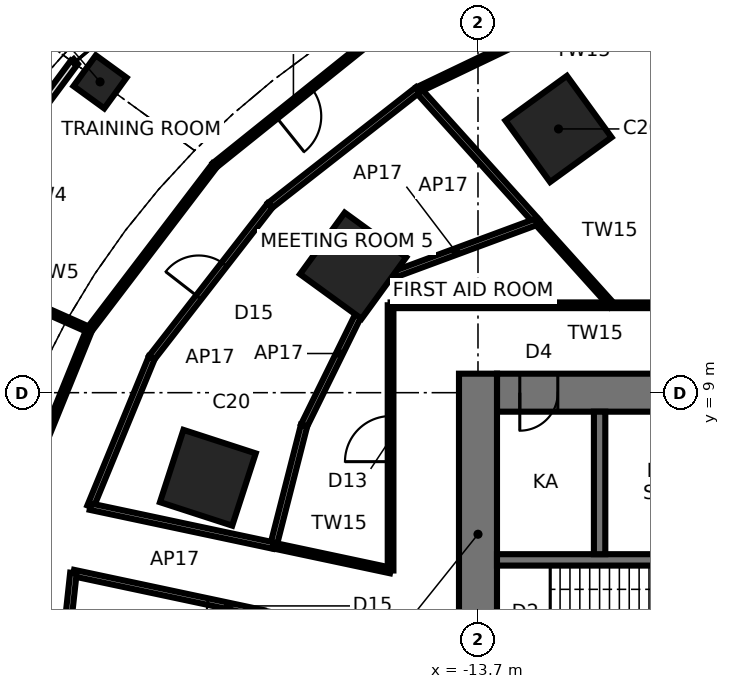
"""IFC4 building model, lengths in metres.
Left out: names, types, materials, properties, quantities, classifications, styles, units other than length and angle.
Written with IfcOpenShell. Run it as: python <this file> out.ifc"""

import sys

from ifc_helpers import new_model, si_unit, direction, frame, frame_2d, origin, origin_2d, place, context, subcontext, project, spatial, rectangle, extrude, element, fill, save


model = new_model("IFC4")
c1 = context("Model", 3, precision=1e-05, world=origin(), true_north=direction((0.0, 1.0)))
c2 = subcontext(c1, "Body", "Model", "MODEL_VIEW")
j1 = project(units=[si_unit("LENGTHUNIT", "METRE"), si_unit("PLANEANGLEUNIT", "RADIAN")], contexts=[c1])
p1 = place(None, origin())
s1 = spatial("IfcSite", under=j1, at=p1, CompositionType="ELEMENT")
p2 = place(p1, origin())
s2 = spatial("IfcBuilding", under=s1, at=p2, CompositionType="ELEMENT")
p3 = place(p2, frame((0.0, 0.0, 15.1)))
s3 = spatial("IfcBuildingStorey", under=s2, at=p3, CompositionType="ELEMENT", Elevation=15.1)
for number, where, z_axis, x_axis in (
    (1, (-11.581, 15.94, 0.0), (0.0, 0.0, 1.0), (-0.588, 0.809, 0.0)),
    (2, (-16.986, 12.341, 0.0), (0.0, 0.0, 1.0), (-0.809, 0.588, 0.0)),
    (3, (-20.808, 6.761, 0.0), (0.0, 0.0, 1.0), (-0.951, 0.309, 0.0)),
):
    element("IfcColumn", number, at=place(p3, frame(where, z_axis=z_axis, x_axis=x_axis)), inside=s3, PredefinedType="COLUMN", context=c2, shape_type="SweptSolid", body=[
        extrude(rectangle(XDim=2.0, YDim=2.0, at=origin_2d()), origin(), (0.0, 0.0, 1.0), 4.5),
    ])
p4 = place(p3, frame((-23.645, 17.179, 0.0), z_axis=(0.0, 0.0, 1.0), x_axis=(-0.809016994375, 0.587785252292, 0.0)))
e4 = element("IfcColumn", 4, at=p4, inside=s3, PredefinedType="COLUMN", context=c2, shape_type="SweptSolid", body=[
    extrude(rectangle(XDim=1.0, YDim=1.0, at=origin_2d()), origin(), (0.0, 0.0, 1.0), 4.5),
])
p5 = place(p3, frame((13.2, 9.0, 0.0), z_axis=(0.0, 0.0, 1.0), x_axis=(-1.0, 0.0, 0.0)))
e5 = element("IfcWall", 5, at=p5, inside=s3, PredefinedType="SHEAR", context=c2, shape_type="SweptSolid", body=[
    extrude(rectangle(XDim=26.4, YDim=1.0, at=frame_2d((13.2, 0.0))), origin(), (0.0, 0.0, 1.0), 4.5),
])
p6 = place(p5, frame((2.65, 0.0, 0.0)))
e6 = element("IfcOpeningElement", 6, at=p6, cuts=e5, PredefinedType="OPENING", context=c2, shape_type="SweptSolid", body=[
    extrude(rectangle(XDim=0.9, YDim=2.1, at=frame_2d((0.45, 1.05))), frame((0.0, 0.51, 0.0), z_axis=(0.0, -1.0, 0.0), x_axis=(1.0, 0.0, 0.0)), (0.0, 0.0, 1.0), 1.02),
])
p7 = place(p5, frame((9.5, 0.0, 0.0)))
e7 = element("IfcOpeningElement", 7, at=p7, cuts=e5, PredefinedType="OPENING", context=c2, shape_type="SweptSolid", body=[
    extrude(rectangle(XDim=0.9, YDim=2.1, at=frame_2d((0.45, 1.05))), frame((0.0, 0.51, 0.0), z_axis=(0.0, -1.0, 0.0), x_axis=(1.0, 0.0, 0.0)), (0.0, 0.0, 1.0), 1.02),
])
p8 = place(p5, frame((16.0, 0.0, 0.0)))
e8 = element("IfcOpeningElement", 8, at=p8, cuts=e5, PredefinedType="OPENING", context=c2, shape_type="SweptSolid", body=[
    extrude(rectangle(XDim=0.9, YDim=2.1, at=frame_2d((0.45, 1.05))), frame((0.0, 0.51, 0.0), z_axis=(0.0, -1.0, 0.0), x_axis=(1.0, 0.0, 0.0)), (0.0, 0.0, 1.0), 1.02),
])
p9 = place(p5, frame((21.25, 0.0, 0.0)))
e9 = element("IfcOpeningElement", 9, at=p9, cuts=e5, PredefinedType="OPENING", context=c2, shape_type="SweptSolid", body=[
    extrude(rectangle(XDim=0.9, YDim=2.1, at=frame_2d((0.45, 1.05))), frame((0.0, 0.51, 0.0), z_axis=(0.0, -1.0, 0.0), x_axis=(1.0, 0.0, 0.0)), (0.0, 0.0, 1.0), 1.02),
])
p10 = place(p5, frame((24.8, 0.0, 0.0)))
e10 = element("IfcOpeningElement", 10, at=p10, cuts=e5, PredefinedType="OPENING", context=c2, shape_type="SweptSolid", body=[
    extrude(rectangle(XDim=1.0, YDim=2.1, at=frame_2d((0.5, 1.05))), frame((0.0, 0.51, 0.0), z_axis=(0.0, -1.0, 0.0), x_axis=(1.0, 0.0, 0.0)), (0.0, 0.0, 1.0), 1.02),
])
p11 = place(p3, frame((-13.7, 9.5, 0.0), z_axis=(0.0, 0.0, 1.0), x_axis=(0.0, -1.0, 0.0)))
e11 = element("IfcWall", 11, at=p11, inside=s3, PredefinedType="SHEAR", context=c2, shape_type="SweptSolid", body=[
    extrude(rectangle(XDim=19.0, YDim=1.0, at=frame_2d((9.5, 0.0))), origin(), (0.0, 0.0, 1.0), 4.5),
])
p12 = place(p11, frame((8.6, 0.0, 0.0)))
e12 = element("IfcOpeningElement", 12, at=p12, cuts=e11, PredefinedType="OPENING", context=c2, shape_type="SweptSolid", body=[
    extrude(rectangle(XDim=1.8, YDim=2.4, at=frame_2d((0.9, 1.2))), frame((0.0, 0.51, 0.0), z_axis=(0.0, -1.0, 0.0), x_axis=(1.0, 0.0, 0.0)), (0.0, 0.0, 1.0), 1.02),
])
p13 = place(p3, frame((-13.2, 4.6, 0.0), z_axis=(0.0, 0.0, 1.0), x_axis=(1.0, 0.0, 0.0)))
e13 = element("IfcWall", 13, at=p13, inside=s3, PredefinedType="SHEAR", context=c2, shape_type="SweptSolid", body=[
    extrude(rectangle(XDim=26.4, YDim=0.3, at=frame_2d((13.2, 0.0))), origin(), (0.0, 0.0, 1.0), 4.5),
])
p14 = place(p3, frame((-10.5, 4.75, 0.0), z_axis=(0.0, 0.0, 1.0), x_axis=(0.0, 1.0, 0.0)))
e14 = element("IfcWall", 14, at=p14, inside=s3, PredefinedType="SHEAR", context=c2, shape_type="SweptSolid", body=[
    extrude(rectangle(XDim=3.75, YDim=0.3, at=frame_2d((1.875, 0.0))), origin(), (0.0, 0.0, 1.0), 4.5),
])
p15 = place(p3, frame((-24.332, 17.678, 0.0), z_axis=(0.0, 0.0, 1.0), x_axis=(-0.595729578383, -0.803185077949, 0.0)))
e15 = element("IfcWall", 15, at=p15, inside=s3, PredefinedType="SOLIDWALL", context=c2, shape_type="SweptSolid", body=[
    extrude(rectangle(XDim=6.407, YDim=0.2, at=frame_2d((3.203, 0.0))), origin(), (0.0, 0.0, 1.0), 4.3),
])
p16 = place(p15, frame((5.007, 0.0, 0.0)))
e16 = element("IfcOpeningElement", 16, at=p16, cuts=e15, PredefinedType="OPENING", context=c2, shape_type="SweptSolid", body=[
    extrude(rectangle(XDim=1.0, YDim=2.4, at=frame_2d((0.5, 1.2))), frame((0.0, 0.11, 0.0), z_axis=(0.0, -1.0, 0.0), x_axis=(1.0, 0.0, 0.0)), (0.0, 0.0, 1.0), 0.22),
])
p17 = place(p15, frame((3.907, 0.0, 0.3)))
e17 = element("IfcOpeningElement", 17, at=p17, cuts=e15, PredefinedType="OPENING", context=c2, shape_type="SweptSolid", body=[
    extrude(rectangle(XDim=0.9, YDim=2.1, at=frame_2d((0.45, 1.05))), frame((0.0, 0.11, 0.0), z_axis=(0.0, -1.0, 0.0), x_axis=(1.0, 0.0, 0.0)), (0.0, 0.0, 1.0), 0.22),
])
p18 = place(p15, frame((5.007, 0.0, 2.7)))
e18 = element("IfcOpeningElement", 18, at=p18, cuts=e15, PredefinedType="OPENING", context=c2, shape_type="SweptSolid", body=[
    extrude(rectangle(XDim=1.0, YDim=0.6, at=frame_2d((0.5, 0.3))), frame((0.0, 0.11, 0.0), z_axis=(0.0, -1.0, 0.0), x_axis=(1.0, 0.0, 0.0)), (0.0, 0.0, 1.0), 0.22),
])
p19 = place(p3, frame((6.524, 11.3, 0.0), z_axis=(0.0, 0.0, 1.0), x_axis=(-1.0, 0.0, 0.0)))
e19 = element("IfcWall", 19, at=p19, inside=s3, PredefinedType="PARTITIONING", context=c2, shape_type="SweptSolid", body=[
    extrude(rectangle(XDim=22.524, YDim=0.15, at=frame_2d((11.262, 0.0))), origin(), (0.0, 0.0, 1.0), 4.3),
])
p20 = place(p19, frame((10.393, 0.0, 0.0)))
e20 = element("IfcOpeningElement", 20, at=p20, cuts=e19, PredefinedType="OPENING", context=c2, shape_type="SweptSolid", body=[
    extrude(rectangle(XDim=1.2, YDim=2.4, at=frame_2d((0.6, 1.2))), frame((0.0, 0.085, 0.0), z_axis=(0.0, -1.0, 0.0), x_axis=(1.0, 0.0, 0.0)), (0.0, 0.0, 1.0), 0.17),
])
p21 = place(p19, frame((2.068, 0.0, 0.0)))
e21 = element("IfcOpeningElement", 21, at=p21, cuts=e19, PredefinedType="OPENING", context=c2, shape_type="SweptSolid", body=[
    extrude(rectangle(XDim=1.2, YDim=2.4, at=frame_2d((0.6, 1.2))), frame((0.0, 0.085, 0.0), z_axis=(0.0, -1.0, 0.0), x_axis=(1.0, 0.0, 0.0)), (0.0, 0.0, 1.0), 0.17),
])
p22 = place(p3, frame((-15.281, 16.972, 0.0), z_axis=(0.0, 0.0, 1.0), x_axis=(0.901954568833, 0.431830934234, 0.0)))
e22 = element("IfcWall", 22, at=p22, inside=s3, PredefinedType="PARTITIONING", context=c2, shape_type="SweptSolid", body=[
    extrude(rectangle(XDim=4.763, YDim=0.15, at=frame_2d((2.381, 0.0))), origin(), (0.0, 0.0, 1.0), 4.3),
])
p23 = place(p3, frame((-12.156, 13.5, 0.0), z_axis=(0.0, 0.0, 1.0), x_axis=(-0.669135077133, 0.74314079995, 0.0)))
e23 = element("IfcWall", 23, at=p23, inside=s3, PredefinedType="PARTITIONING", context=c2, shape_type="SweptSolid", body=[
    extrude(rectangle(XDim=4.671, YDim=0.17, at=frame_2d((2.336, 0.0))), origin(), (0.0, 0.0, 1.0), 4.3),
])
p24 = place(p3, frame((-10.175, 11.3, 0.0), z_axis=(0.0, 0.0, 1.0), x_axis=(-0.669156051145, 0.7431219141, 0.0)))
e24 = element("IfcWall", 24, at=p24, inside=s3, PredefinedType="PARTITIONING", context=c2, shape_type="SweptSolid", body=[
    extrude(rectangle(XDim=2.961, YDim=0.15, at=frame_2d((1.48, 0.0))), origin(), (0.0, 0.0, 1.0), 4.3),
])
p25 = place(p3, frame((-16.486, 18.309, 0.0), z_axis=(0.0, 0.0, 1.0), x_axis=(-0.779898885774, -0.625905526393, 0.0)))
e25 = element("IfcWall", 25, at=p25, inside=s3, PredefinedType="PARTITIONING", context=c2, shape_type="SweptSolid", body=[
    extrude(rectangle(XDim=5.31, YDim=0.15, at=frame_2d((2.655, 0.0))), origin(), (0.0, 0.0, 1.0), 4.3),
])
p26 = place(p25, frame((2.055, 0.0, 0.0)))
e26 = element("IfcOpeningElement", 26, at=p26, cuts=e25, PredefinedType="OPENING", context=c2, shape_type="SweptSolid", body=[
    extrude(rectangle(XDim=1.2, YDim=2.4, at=frame_2d((0.6, 1.2))), frame((0.0, 0.085, 0.0), z_axis=(0.0, -1.0, 0.0), x_axis=(1.0, 0.0, 0.0)), (0.0, 0.0, 1.0), 0.17),
])
p27 = place(p3, frame((-19.17, 13.928, 0.0), z_axis=(0.0, 0.0, 1.0), x_axis=(0.787485179354, 0.616333588487, 0.0)))
e27 = element("IfcWall", 27, at=p27, inside=s3, PredefinedType="PARTITIONING", context=c2, shape_type="SweptSolid", body=[
    extrude(rectangle(XDim=4.938, YDim=0.17, at=frame_2d((2.469, 0.0))), origin(), (0.0, 0.0, 1.0), 4.3),
])
p28 = place(p3, frame((-16.413, 11.925, 0.0), z_axis=(0.0, 0.0, 1.0), x_axis=(0.937814922048, 0.34713566798, 0.0)))
e28 = element("IfcWall", 28, at=p28, inside=s3, PredefinedType="PARTITIONING", context=c2, shape_type="SweptSolid", body=[
    extrude(rectangle(XDim=4.539, YDim=0.17, at=frame_2d((2.27, 0.0))), origin(), (0.0, 0.0, 1.0), 4.3),
])
p29 = place(p3, frame((-18.276, 8.137, 0.0), z_axis=(0.0, 0.0, 1.0), x_axis=(0.44142043443, 0.897300395669, 0.0)))
e29 = element("IfcWall", 29, at=p29, inside=s3, PredefinedType="PARTITIONING", context=c2, shape_type="SweptSolid", body=[
    extrude(rectangle(XDim=4.221, YDim=0.17, at=frame_2d((2.111, 0.0))), origin(), (0.0, 0.0, 1.0), 4.3),
])
p30 = place(p3, frame((-20.627, 14.986, 0.0), z_axis=(0.0, 0.0, 1.0), x_axis=(-0.606135035954, -0.795361753034, 0.0)))
e30 = element("IfcWall", 30, at=p30, inside=s3, PredefinedType="PARTITIONING", context=c2, shape_type="SweptSolid", body=[
    extrude(rectangle(XDim=5.447, YDim=0.15, at=frame_2d((2.724, 0.0))), origin(), (0.0, 0.0, 1.0), 4.3),
])
p31 = place(p3, frame((-22.284, 9.921, 0.0), z_axis=(0.0, 0.0, 1.0), x_axis=(0.613607456707, 0.789611226537, 0.0)))
e31 = element("IfcWall", 31, at=p31, inside=s3, PredefinedType="PARTITIONING", context=c2, shape_type="SweptSolid", body=[
    extrude(rectangle(XDim=5.074, YDim=0.17, at=frame_2d((2.537, 0.0))), origin(), (0.0, 0.0, 1.0), 4.3),
])
p32 = place(p31, frame((2.012, 0.0, 0.0)))
e32 = element("IfcOpeningElement", 32, at=p32, cuts=e31, PredefinedType="OPENING", context=c2, shape_type="SweptSolid", body=[
    extrude(rectangle(XDim=1.1, YDim=2.4, at=frame_2d((0.55, 1.2))), frame((0.0, 0.095, 0.0), z_axis=(0.0, -1.0, 0.0), x_axis=(1.0, 0.0, 0.0)), (0.0, 0.0, 1.0), 0.19),
])
p33 = place(p3, frame((-16.0, 11.3, 0.0), z_axis=(0.0, 0.0, 1.0), x_axis=(0.0, -1.0, 0.0)))
e33 = element("IfcWall", 33, at=p33, inside=s3, PredefinedType="PARTITIONING", context=c2, shape_type="SweptSolid", body=[
    extrude(rectangle(XDim=6.979, YDim=0.15, at=frame_2d((3.49, 0.0))), origin(), (0.0, 0.0, 1.0), 4.3),
])
p34 = place(p33, frame((2.915, 0.0, 0.0)))
e34 = element("IfcOpeningElement", 34, at=p34, cuts=e33, PredefinedType="OPENING", context=c2, shape_type="SweptSolid", body=[
    extrude(rectangle(XDim=1.2, YDim=2.4, at=frame_2d((0.6, 1.2))), frame((0.0, 0.085, 0.0), z_axis=(0.0, -1.0, 0.0), x_axis=(1.0, 0.0, 0.0)), (0.0, 0.0, 1.0), 0.17),
])
p35 = place(p3, frame((-23.928, 10.654, 0.0), z_axis=(0.0, 0.0, 1.0), x_axis=(-0.913547449471, 0.406732169326, 0.0)))
e35 = element("IfcWall", 35, at=p35, inside=s3, PredefinedType="PARTITIONING", context=c2, shape_type="SweptSolid", body=[
    extrude(rectangle(XDim=4.54, YDim=0.15, at=frame_2d((2.27, 0.0))), origin(), (0.0, 0.0, 1.0), 4.3),
])
p36 = place(p3, frame((-19.083, 4.976, 0.0), z_axis=(0.0, 0.0, 1.0), x_axis=(0.247568605717, 0.968870365665, 0.0)))
e36 = element("IfcWall", 36, at=p36, inside=s3, PredefinedType="PARTITIONING", context=c2, shape_type="SweptSolid", body=[
    extrude(rectangle(XDim=3.262, YDim=0.17, at=frame_2d((1.631, 0.0))), origin(), (0.0, 0.0, 1.0), 4.3),
])
p37 = place(p3, frame((-23.9, 6.0, 0.0), z_axis=(0.0, 0.0, 1.0), x_axis=(0.381027738685, 0.92456360644, 0.0)))
e37 = element("IfcWall", 37, at=p37, inside=s3, PredefinedType="PARTITIONING", context=c2, shape_type="SweptSolid", body=[
    extrude(rectangle(XDim=4.241, YDim=0.17, at=frame_2d((2.121, 0.0))), origin(), (0.0, 0.0, 1.0), 4.3),
])
p38 = place(p3, frame((-23.928, 10.654, 0.0), z_axis=(0.0, 0.0, 1.0), x_axis=(-0.376134336796, -0.92656514109, 0.0)))
e38 = element("IfcWall", 38, at=p38, inside=s3, PredefinedType="PARTITIONING", context=c2, shape_type="SweptSolid", body=[
    extrude(rectangle(XDim=5.531, YDim=0.15, at=frame_2d((2.766, 0.0))), origin(), (0.0, 0.0, 1.0), 4.3),
])
p39 = place(p3, frame((-16.0, 4.321, 0.0), z_axis=(0.0, 0.0, 1.0), x_axis=(-0.978156882567, 0.207868018433, 0.0)))
e39 = element("IfcWall", 39, at=p39, inside=s3, PredefinedType="PARTITIONING", context=c2, shape_type="SweptSolid", body=[
    extrude(rectangle(XDim=3.152, YDim=0.15, at=frame_2d((1.576, 0.0))), origin(), (0.0, 0.0, 1.0), 4.3),
])
p40 = place(p3, frame((-19.083, 4.976, 0.0), z_axis=(0.0, 0.0, 1.0), x_axis=(-0.97814070171, 0.207944145528, 0.0)))
e40 = element("IfcWall", 40, at=p40, inside=s3, PredefinedType="PARTITIONING", context=c2, shape_type="SweptSolid", body=[
    extrude(rectangle(XDim=4.924, YDim=0.17, at=frame_2d((2.462, 0.0))), origin(), (0.0, 0.0, 1.0), 4.3),
])
p41 = place(p3, frame((-24.346, 4.255, 0.0), z_axis=(0.0, 0.0, 1.0), x_axis=(0.978143029593, -0.20793319518, 0.0)))
e41 = element("IfcWall", 41, at=p41, inside=s3, PredefinedType="PARTITIONING", context=c2, shape_type="SweptSolid", body=[
    extrude(rectangle(XDim=5.099, YDim=0.17, at=frame_2d((2.55, 0.0))), origin(), (0.0, 0.0, 1.0), 4.3),
])
p42 = place(p41, frame((3.616, 0.0, 0.0)))
e42 = element("IfcOpeningElement", 42, at=p42, cuts=e41, PredefinedType="OPENING", context=c2, shape_type="SweptSolid", body=[
    extrude(rectangle(XDim=1.1, YDim=2.4, at=frame_2d((0.55, 1.2))), frame((0.0, 0.095, 0.0), z_axis=(0.0, -1.0, 0.0), x_axis=(1.0, 0.0, 0.0)), (0.0, 0.0, 1.0), 0.19),
])
p43 = place(p3, frame((-24.808, 0.0, 0.0), z_axis=(0.0, 0.0, 1.0), x_axis=(0.107983193609, 0.994152719605, 0.0)))
e43 = element("IfcWall", 43, at=p43, inside=s3, PredefinedType="PARTITIONING", context=c2, shape_type="SweptSolid", body=[
    extrude(rectangle(XDim=4.28, YDim=0.17, at=frame_2d((2.14, 0.0))), origin(), (0.0, 0.0, 1.0), 4.3),
])
p44 = place(p10, origin())
e44 = element("IfcDoor", 44, at=p44, inside=s3, OperationType="SINGLE_SWING_RIGHT", PredefinedType="DOOR", context=c2, shape_type="SweptSolid", body=[
    extrude(rectangle(XDim=0.92, YDim=2.06, at=frame_2d((0.5, 1.03))), frame((0.0, 0.025, 0.0), z_axis=(0.0, -1.0, 0.0), x_axis=(1.0, 0.0, 0.0)), (0.0, 0.0, 1.0), 0.05),
    extrude(rectangle(XDim=0.04, YDim=2.1, at=frame_2d((0.02, 1.05))), frame((0.0, 0.25, 0.0), z_axis=(0.0, -1.0, 0.0), x_axis=(1.0, 0.0, 0.0)), (0.0, 0.0, 1.0), 0.5),
    extrude(rectangle(XDim=0.04, YDim=2.1, at=frame_2d((0.98, 1.05))), frame((0.0, 0.25, 0.0), z_axis=(0.0, -1.0, 0.0), x_axis=(1.0, 0.0, 0.0)), (0.0, 0.0, 1.0), 0.5),
    extrude(rectangle(XDim=0.92, YDim=0.04, at=frame_2d((0.5, 2.08))), frame((0.0, 0.25, 0.0), z_axis=(0.0, -1.0, 0.0), x_axis=(1.0, 0.0, 0.0)), (0.0, 0.0, 1.0), 0.5),
])
fill(e10, e44)
p45 = place(p34, frame((1.2, 0.0, 0.0), z_axis=(0.0, 0.0, 1.0), x_axis=(-1.0, 0.0, 0.0)))
e45 = element("IfcDoor", 45, at=p45, inside=s3, OperationType="SINGLE_SWING_LEFT", PredefinedType="DOOR", context=c2, shape_type="SweptSolid", body=[
    extrude(rectangle(XDim=1.2, YDim=2.4, at=frame_2d((0.6, 1.2))), frame((0.0, 0.025, 0.0), z_axis=(0.0, -1.0, 0.0), x_axis=(1.0, 0.0, 0.0)), (0.0, 0.0, 1.0), 0.05),
])
fill(e34, e45)
p46 = place(p32, origin())
e46 = element("IfcDoor", 46, at=p46, inside=s3, OperationType="SINGLE_SWING_LEFT", PredefinedType="DOOR", context=c2, shape_type="SweptSolid", body=[
    extrude(rectangle(XDim=1.1, YDim=2.4, at=frame_2d((0.55, 1.2))), frame((0.0, 0.025, 0.0), z_axis=(0.0, -1.0, 0.0), x_axis=(1.0, 0.0, 0.0)), (0.0, 0.0, 1.0), 0.05),
])
fill(e32, e46)
p47 = place(p42, frame((1.1, 0.0, 0.0), z_axis=(0.0, 0.0, 1.0), x_axis=(-1.0, 0.0, 0.0)))
e47 = element("IfcDoor", 47, at=p47, inside=s3, OperationType="SINGLE_SWING_LEFT", PredefinedType="DOOR", context=c2, shape_type="SweptSolid", body=[
    extrude(rectangle(XDim=1.1, YDim=2.4, at=frame_2d((0.55, 1.2))), frame((0.0, 0.025, 0.0), z_axis=(0.0, -1.0, 0.0), x_axis=(1.0, 0.0, 0.0)), (0.0, 0.0, 1.0), 0.05),
])
fill(e42, e47)
p48 = place(p26, origin())
e48 = element("IfcDoor", 48, at=p48, inside=s3, OperationType="SINGLE_SWING_RIGHT", PredefinedType="DOOR", context=c2, shape_type="SweptSolid", body=[
    extrude(rectangle(XDim=1.2, YDim=2.4, at=frame_2d((0.6, 1.2))), frame((0.0, 0.025, 0.0), z_axis=(0.0, -1.0, 0.0), x_axis=(1.0, 0.0, 0.0)), (0.0, 0.0, 1.0), 0.05),
])
fill(e26, e48)
save(model, sys.argv[1])
